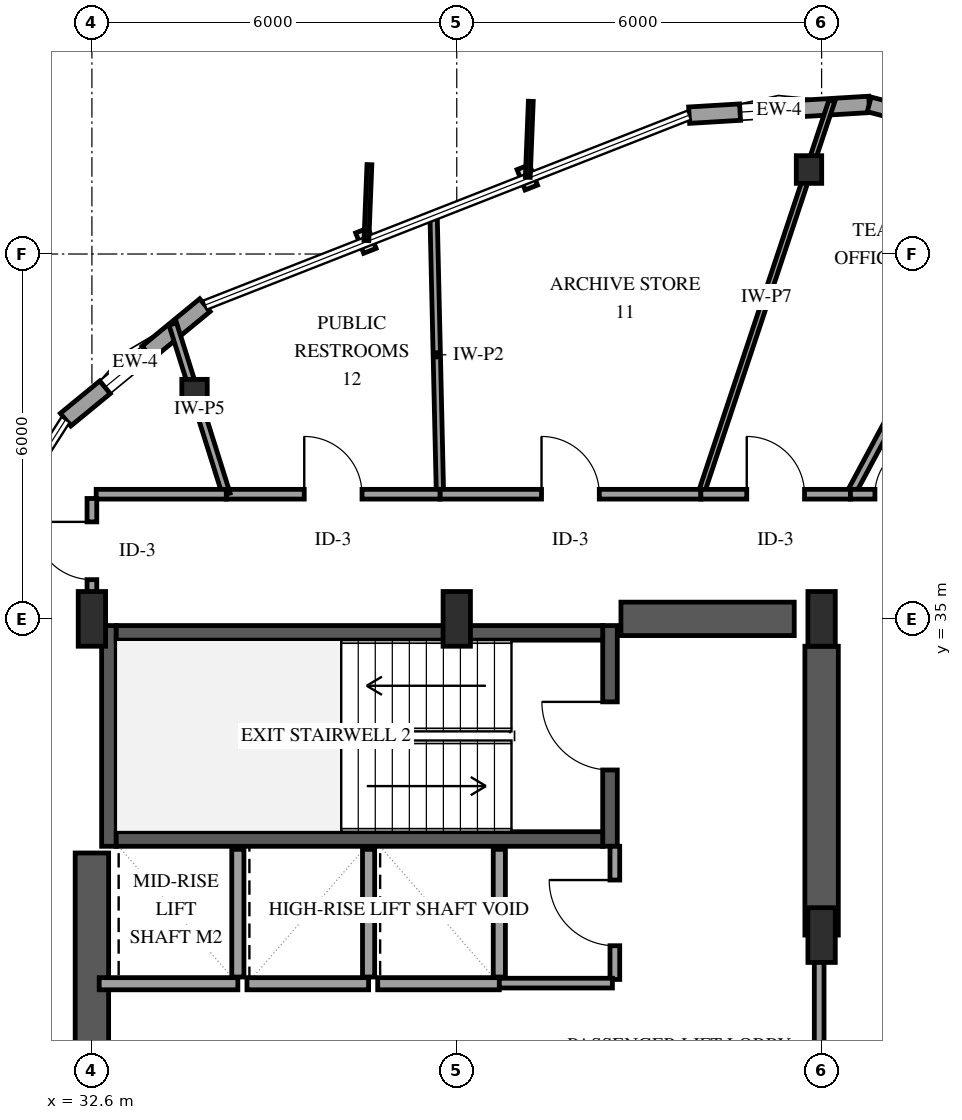
"""IFC4 building model, lengths in metres.
Left out: names, types, materials, properties, quantities, classifications, styles, units other than length and angle.
Written with IfcOpenShell. Run it as: python <this file> out.ifc"""

import sys

from ifc_helpers import new_model, si_unit, direction, frame, frame_2d, origin, origin_2d, place, context, subcontext, project, spatial, rectangle, i_section, extrude, element, fill, save


model = new_model("IFC4")
c1 = context("Model", 3, precision=1e-05, world=origin(), true_north=direction((0.0, 1.0)))
c2 = subcontext(c1, "Body", "Model", "MODEL_VIEW")
j1 = project(units=[si_unit("LENGTHUNIT", "METRE"), si_unit("PLANEANGLEUNIT", "RADIAN")], contexts=[c1])
p1 = place(None, origin())
s1 = spatial("IfcSite", under=j1, at=p1, CompositionType="ELEMENT")
p2 = place(p1, origin())
s2 = spatial("IfcBuilding", under=s1, at=p2, CompositionType="ELEMENT")
p3 = place(p2, frame((0.0, 0.0, 110.8)))
s3 = spatial("IfcBuildingStorey", under=s2, at=p3, CompositionType="ELEMENT", Elevation=110.8)
p4 = place(p3, frame((32.88, 31.26, 0.0), z_axis=(0.0, 0.0, 1.0), x_axis=(0.0, 1.0, 0.0)))
e1 = element("IfcWall", 1, at=p4, inside=s3, PredefinedType="SHEAR", context=c2, shape_type="SweptSolid", body=[
    extrude(rectangle(XDim=3.63, YDim=0.24, at=frame_2d((1.815, 0.0))), origin(), (0.0, 0.0, 1.0), 3.9),
])
p5 = place(p3, frame((41.12, 31.26, 0.0), z_axis=(0.0, 0.0, 1.0), x_axis=(0.0, 1.0, 0.0)))
e2 = element("IfcWall", 2, at=p5, inside=s3, PredefinedType="SHEAR", context=c2, shape_type="SweptSolid", body=[
    extrude(rectangle(XDim=3.63, YDim=0.24, at=frame_2d((1.815, 0.0))), origin(), (0.0, 0.0, 1.0), 3.9),
])
p6 = place(p5, frame((1.255, 0.0, 0.0)))
e3 = element("IfcOpeningElement", 3, at=p6, cuts=e2, PredefinedType="OPENING", context=c2, shape_type="SweptSolid", body=[
    extrude(rectangle(XDim=1.12, YDim=2.15, at=frame_2d((0.56, 1.075))), frame((0.0, 0.13, 0.0), z_axis=(0.0, -1.0, 0.0), x_axis=(1.0, 0.0, 0.0)), (0.0, 0.0, 1.0), 0.26),
])
for number, where, z_axis, x_axis in (
    (4, (33.0, 31.38, 0.0), (0.0, 0.0, 1.0), (1.0, 0.0, 0.0)),
    (5, (33.0, 34.77, 0.0), (0.0, 0.0, 1.0), (1.0, 0.0, 0.0)),
):
    element("IfcWall", number, at=place(p3, frame(where, z_axis=z_axis, x_axis=x_axis)), inside=s3, PredefinedType="SHEAR", context=c2, shape_type="SweptSolid", body=[
        extrude(rectangle(XDim=8.0, YDim=0.24, at=frame_2d((4.0, 0.0))), origin(), (0.0, 0.0, 1.0), 3.9),
    ])
p7 = place(p3, frame((32.6, 18.85, 0.0), z_axis=(0.0, 0.0, 1.0), x_axis=(0.0, 1.0, 0.0)))
e6 = element("IfcWall", 6, at=p7, inside=s3, PredefinedType="SHEAR", context=c2, shape_type="SweptSolid", body=[
    extrude(rectangle(XDim=12.3, YDim=0.55, at=frame_2d((6.15, 0.0))), origin(), (0.0, 0.0, 1.0), 3.9),
])
p8 = place(p3, frame((41.3, 35.0, 0.0), z_axis=(0.0, 0.0, 1.0), x_axis=(1.0, 0.0, 0.0)))
e7 = element("IfcWall", 7, at=p8, inside=s3, PredefinedType="SHEAR", context=c2, shape_type="SweptSolid", body=[
    extrude(rectangle(XDim=2.85, YDim=0.55, at=frame_2d((1.425, 0.0))), origin(), (0.0, 0.0, 1.0), 3.9),
])
p9 = place(p3, frame((44.6, 29.8, 0.0), z_axis=(0.0, 0.0, 1.0), x_axis=(0.0, 1.0, 0.0)))
e8 = element("IfcWall", 8, at=p9, inside=s3, PredefinedType="SHEAR", context=c2, shape_type="SweptSolid", body=[
    extrude(rectangle(XDim=4.75, YDim=0.55, at=frame_2d((2.375, 0.0))), origin(), (0.0, 0.0, 1.0), 3.9),
])
for number, where, z_axis, x_axis in (
    (9, (32.6, 35.0, 0.0), (0.0, 0.0, 1.0), (1.0, 0.0, 0.0)),
    (10, (38.6, 35.0, 0.0), (0.0, 0.0, 1.0), (1.0, 0.0, 0.0)),
    (11, (44.6, 29.8, 0.0), (0.0, 0.0, 1.0), (1.0, 0.0, 0.0)),
    (12, (44.6, 35.0, 0.0), (0.0, 0.0, 1.0), (1.0, 0.0, 0.0)),
):
    element("IfcColumn", number, at=place(p3, frame(where, z_axis=z_axis, x_axis=x_axis)), inside=s3, PredefinedType="PILASTER", context=c2, shape_type="SweptSolid", body=[
        extrude(rectangle(XDim=0.45, YDim=0.9, at=origin_2d()), origin(), (0.0, 0.0, 1.0), 3.9),
    ])
for number, where, z_axis, x_axis in (
    (13, (44.393, 42.389, 0.0), (0.0, 0.0, 1.0), (1.0, 0.0, 0.0)),
    (14, (34.288, 38.711, 0.0), (0.0, 0.0, 1.0), (1.0, 0.0, 0.0)),
):
    element("IfcColumn", number, at=place(p3, frame(where, z_axis=z_axis, x_axis=x_axis)), inside=s3, PredefinedType="COLUMN", context=c2, shape_type="SweptSolid", body=[
        extrude(i_section(OverallWidth=0.418, OverallDepth=0.455, WebThickness=0.042, FlangeThickness=0.068, FilletRadius=0.038, at=origin_2d()), origin(), (0.0, 0.0, 1.0), 3.9),
    ])
p10 = place(p3, frame((45.383, 43.46, 0.0), z_axis=(0.0, 0.0, 1.0), x_axis=(-0.998218594755, -0.059662694245, 0.0)))
e15 = element("IfcWall", 15, at=p10, inside=s3, PredefinedType="SOLIDWALL", context=c2, shape_type="SweptSolid", body=[
    extrude(rectangle(XDim=2.967, YDim=0.27, at=frame_2d((1.483, 0.0))), origin(), (0.0, 0.0, 1.0), 2.979),
])
p11 = place(p10, frame((1.228, 0.0, 0.75)))
e16 = element("IfcOpeningElement", 16, at=p11, cuts=e15, PredefinedType="OPENING", context=c2, shape_type="SweptSolid", body=[
    extrude(rectangle(XDim=0.9, YDim=1.5, at=frame_2d((0.45, 0.75))), frame((0.0, 0.145, 0.0), z_axis=(0.0, -1.0, 0.0), x_axis=(1.0, 0.0, 0.0)), (0.0, 0.0, 1.0), 0.29),
])
p12 = place(p3, frame((53.66, 41.307, 0.0), z_axis=(0.0, 0.0, 1.0), x_axis=(-0.967796780787, 0.251732777164, 0.0)))
e17 = element("IfcWall", 17, at=p12, inside=s3, PredefinedType="SOLIDWALL", context=c2, shape_type="SweptSolid", body=[
    extrude(rectangle(XDim=8.553, YDim=0.25, at=frame_2d((4.276, 0.0))), origin(), (0.0, 0.0, 1.0), 2.979),
])
p13 = place(p12, frame((3.777, 0.0, 0.0)))
e18 = element("IfcOpeningElement", 18, at=p13, cuts=e17, PredefinedType="OPENING", context=c2, shape_type="SweptSolid", body=[
    extrude(rectangle(XDim=1.05, YDim=2.15, at=frame_2d((0.525, 1.075))), frame((0.0, 0.135, 0.0), z_axis=(0.0, -1.0, 0.0), x_axis=(1.0, 0.0, 0.0)), (0.0, 0.0, 1.0), 0.27),
])
p14 = place(p12, frame((0.44, 0.0, 0.72)))
e19 = element("IfcOpeningElement", 19, at=p14, cuts=e17, PredefinedType="OPENING", context=c2, shape_type="SweptSolid", body=[
    extrude(rectangle(XDim=1.2, YDim=1.6, at=frame_2d((0.6, 0.8))), frame((0.0, 0.135, 0.0), z_axis=(0.0, -1.0, 0.0), x_axis=(1.0, 0.0, 0.0)), (0.0, 0.0, 1.0), 0.27),
])
p15 = place(p12, frame((6.19, 0.0, 0.72)))
e20 = element("IfcOpeningElement", 20, at=p15, cuts=e17, PredefinedType="OPENING", context=c2, shape_type="SweptSolid", body=[
    extrude(rectangle(XDim=1.2, YDim=1.6, at=frame_2d((0.6, 0.8))), frame((0.0, 0.135, 0.0), z_axis=(0.0, -1.0, 0.0), x_axis=(1.0, 0.0, 0.0)), (0.0, 0.0, 1.0), 0.27),
])
p16 = place(p3, frame((34.459, 40.16, 0.0), z_axis=(0.0, 0.0, 1.0), x_axis=(-0.772514297214, -0.634997370545, 0.0)))
e21 = element("IfcWall", 21, at=p16, inside=s3, PredefinedType="SOLIDWALL", context=c2, shape_type="SweptSolid", body=[
    extrude(rectangle(XDim=2.967, YDim=0.27, at=frame_2d((1.483, 0.0))), origin(), (0.0, 0.0, 1.0), 2.979),
])
p17 = place(p16, frame((1.228, 0.0, 0.75)))
e22 = element("IfcOpeningElement", 22, at=p17, cuts=e21, PredefinedType="OPENING", context=c2, shape_type="SweptSolid", body=[
    extrude(rectangle(XDim=0.9, YDim=1.5, at=frame_2d((0.45, 0.75))), frame((0.0, 0.145, 0.0), z_axis=(0.0, -1.0, 0.0), x_axis=(1.0, 0.0, 0.0)), (0.0, 0.0, 1.0), 0.29),
])
p18 = place(p3, frame((32.72, 29.0, 0.0), z_axis=(0.0, 0.0, 1.0), x_axis=(1.0, 0.0, 0.0)))
e23 = element("IfcWall", 23, at=p18, inside=s3, PredefinedType="SOLIDWALL", context=c2, shape_type="SweptSolid", body=[
    extrude(rectangle(XDim=2.28, YDim=0.2, at=frame_2d((1.14, 0.0))), origin(), (0.0, 0.0, 1.0), 3.6),
])
p19 = place(p3, frame((35.0, 29.11, 0.0), z_axis=(0.0, 0.0, 1.0), x_axis=(0.0, 1.0, 0.0)))
e24 = element("IfcWall", 24, at=p19, inside=s3, PredefinedType="SOLIDWALL", context=c2, shape_type="SweptSolid", body=[
    extrude(rectangle(XDim=2.1, YDim=0.2, at=frame_2d((1.05, 0.0))), origin(), (0.0, 0.0, 1.0), 3.6),
])
p20 = place(p3, frame((35.15, 29.0, 0.0), z_axis=(0.0, 0.0, 1.0), x_axis=(1.0, 0.0, 0.0)))
e25 = element("IfcWall", 25, at=p20, inside=s3, PredefinedType="SOLIDWALL", context=c2, shape_type="SweptSolid", body=[
    extrude(rectangle(XDim=2.0, YDim=0.2, at=frame_2d((1.0, 0.0))), origin(), (0.0, 0.0, 1.0), 3.6),
])
p21 = place(p3, frame((37.15, 29.11, 0.0), z_axis=(0.0, 0.0, 1.0), x_axis=(0.0, 1.0, 0.0)))
e26 = element("IfcWall", 26, at=p21, inside=s3, PredefinedType="SOLIDWALL", context=c2, shape_type="SweptSolid", body=[
    extrude(rectangle(XDim=2.1, YDim=0.2, at=frame_2d((1.05, 0.0))), origin(), (0.0, 0.0, 1.0), 3.6),
])
p22 = place(p3, frame((37.3, 29.0, 0.0), z_axis=(0.0, 0.0, 1.0), x_axis=(1.0, 0.0, 0.0)))
e27 = element("IfcWall", 27, at=p22, inside=s3, PredefinedType="SOLIDWALL", context=c2, shape_type="SweptSolid", body=[
    extrude(rectangle(XDim=2.0, YDim=0.2, at=frame_2d((1.0, 0.0))), origin(), (0.0, 0.0, 1.0), 3.6),
])
p23 = place(p3, frame((39.3, 29.11, 0.0), z_axis=(0.0, 0.0, 1.0), x_axis=(0.0, 1.0, 0.0)))
e28 = element("IfcWall", 28, at=p23, inside=s3, PredefinedType="SOLIDWALL", context=c2, shape_type="SweptSolid", body=[
    extrude(rectangle(XDim=2.1, YDim=0.2, at=frame_2d((1.05, 0.0))), origin(), (0.0, 0.0, 1.0), 3.6),
])
p24 = place(p3, frame((44.56, 29.8, 0.0), z_axis=(0.0, 0.0, 1.0), x_axis=(0.0, -1.0, 0.0)))
e29 = element("IfcWall", 29, at=p24, inside=s3, PredefinedType="PARTITIONING", context=c2, shape_type="SweptSolid", body=[
    extrude(rectangle(XDim=6.91, YDim=0.16, at=frame_2d((3.455, 0.0))), origin(), (0.0, 0.0, 1.0), 2.64),
])
p25 = place(p24, frame((2.915, 0.0, 0.0)))
e30 = element("IfcOpeningElement", 30, at=p25, cuts=e29, PredefinedType="OPENING", context=c2, shape_type="SweptSolid", body=[
    extrude(rectangle(XDim=1.08, YDim=2.15, at=frame_2d((0.54, 1.075))), frame((0.0, 0.09, 0.0), z_axis=(0.0, -1.0, 0.0), x_axis=(1.0, 0.0, 0.0)), (0.0, 0.0, 1.0), 0.18),
])
p26 = place(p3, frame((42.614, 37.05, 0.0), z_axis=(0.0, 0.0, 1.0), x_axis=(0.316012953592, 0.948754875172, 0.0)))
e31 = element("IfcWall", 31, at=p26, inside=s3, PredefinedType="PARTITIONING", context=c2, shape_type="SweptSolid", body=[
    extrude(rectangle(XDim=6.819, YDim=0.1, at=frame_2d((3.41, 0.0))), origin(), (0.0, 0.0, 1.0), 2.895),
])
p27 = place(p3, frame((45.074, 37.05, 0.0), z_axis=(0.0, 0.0, 1.0), x_axis=(0.473201001123, 0.880954489481, 0.0)))
e32 = element("IfcWall", 32, at=p27, inside=s3, PredefinedType="PARTITIONING", context=c2, shape_type="SweptSolid", body=[
    extrude(rectangle(XDim=6.465, YDim=0.14, at=frame_2d((3.232, 0.0))), origin(), (0.0, 0.0, 1.0), 2.974),
])
p28 = place(p3, frame((38.324, 37.05, 0.0), z_axis=(0.0, 0.0, 1.0), x_axis=(-0.022890699076, 0.999737973619, 0.0)))
e33 = element("IfcWall", 33, at=p28, inside=s3, PredefinedType="PARTITIONING", context=c2, shape_type="SweptSolid", body=[
    extrude(rectangle(XDim=4.586, YDim=0.12, at=frame_2d((2.293, 0.0))), origin(), (0.0, 0.0, 1.0), 3.6),
])
p29 = place(p3, frame((38.324, 37.05, 0.0), z_axis=(0.0, 0.0, 1.0), x_axis=(1.0, 0.0, 0.0)))
e34 = element("IfcWall", 34, at=p29, inside=s3, PredefinedType="PARTITIONING", context=c2, shape_type="SweptSolid", body=[
    extrude(rectangle(XDim=4.29, YDim=0.16, at=frame_2d((2.145, 0.0))), origin(), (0.0, 0.0, 1.0), 3.6),
])
p30 = place(p29, frame((1.67, 0.0, 0.0)))
e35 = element("IfcOpeningElement", 35, at=p30, cuts=e34, PredefinedType="OPENING", context=c2, shape_type="SweptSolid", body=[
    extrude(rectangle(XDim=0.95, YDim=2.15, at=frame_2d((0.475, 1.075))), frame((0.0, 0.09, 0.0), z_axis=(0.0, -1.0, 0.0), x_axis=(1.0, 0.0, 0.0)), (0.0, 0.0, 1.0), 0.18),
])
p31 = place(p3, frame((34.81, 37.05, 0.0), z_axis=(0.0, 0.0, 1.0), x_axis=(1.0, 0.0, 0.0)))
e36 = element("IfcWall", 36, at=p31, inside=s3, PredefinedType="PARTITIONING", context=c2, shape_type="SweptSolid", body=[
    extrude(rectangle(XDim=3.514, YDim=0.16, at=frame_2d((1.757, 0.0))), origin(), (0.0, 0.0, 1.0), 3.6),
])
p32 = place(p31, frame((1.282, 0.0, 0.0)))
e37 = element("IfcOpeningElement", 37, at=p32, cuts=e36, PredefinedType="OPENING", context=c2, shape_type="SweptSolid", body=[
    extrude(rectangle(XDim=0.95, YDim=2.15, at=frame_2d((0.475, 1.075))), frame((0.0, 0.09, 0.0), z_axis=(0.0, -1.0, 0.0), x_axis=(1.0, 0.0, 0.0)), (0.0, 0.0, 1.0), 0.18),
])
p33 = place(p3, frame((34.81, 37.05, 0.0), z_axis=(0.0, 0.0, 1.0), x_axis=(-0.299956409632, 0.953952908859, 0.0)))
e38 = element("IfcWall", 38, at=p33, inside=s3, PredefinedType="PARTITIONING", context=c2, shape_type="SweptSolid", body=[
    extrude(rectangle(XDim=2.934, YDim=0.13, at=frame_2d((1.467, 0.0))), origin(), (0.0, 0.0, 1.0), 2.895),
])
p34 = place(p3, frame((42.614, 37.05, 0.0), z_axis=(0.0, 0.0, 1.0), x_axis=(1.0, 0.0, 0.0)))
e39 = element("IfcWall", 39, at=p34, inside=s3, PredefinedType="PARTITIONING", context=c2, shape_type="SweptSolid", body=[
    extrude(rectangle(XDim=2.46, YDim=0.16, at=frame_2d((1.23, 0.0))), origin(), (0.0, 0.0, 1.0), 3.6),
])
p35 = place(p34, frame((0.755, 0.0, 0.0)))
e40 = element("IfcOpeningElement", 40, at=p35, cuts=e39, PredefinedType="OPENING", context=c2, shape_type="SweptSolid", body=[
    extrude(rectangle(XDim=0.95, YDim=2.15, at=frame_2d((0.475, 1.075))), frame((0.0, 0.09, 0.0), z_axis=(0.0, -1.0, 0.0), x_axis=(1.0, 0.0, 0.0)), (0.0, 0.0, 1.0), 0.18),
])
p36 = place(p3, frame((41.2, 29.07, 0.0), z_axis=(0.0, 0.0, 1.0), x_axis=(0.0, 1.0, 0.0)))
e41 = element("IfcWall", 41, at=p36, inside=s3, PredefinedType="PARTITIONING", context=c2, shape_type="SweptSolid", body=[
    extrude(rectangle(XDim=2.19, YDim=0.16, at=frame_2d((1.095, 0.0))), origin(), (0.0, 0.0, 1.0), 3.6),
])
p37 = place(p36, frame((0.555, 0.0, 0.0)))
e42 = element("IfcOpeningElement", 42, at=p37, cuts=e41, PredefinedType="OPENING", context=c2, shape_type="SweptSolid", body=[
    extrude(rectangle(XDim=1.08, YDim=2.15, at=frame_2d((0.54, 1.075))), frame((0.0, 0.09, 0.0), z_axis=(0.0, -1.0, 0.0), x_axis=(1.0, 0.0, 0.0)), (0.0, 0.0, 1.0), 0.18),
])
p38 = place(p3, frame((32.67, 37.05, 0.0), z_axis=(0.0, 0.0, 1.0), x_axis=(1.0, 0.0, 0.0)))
e43 = element("IfcWall", 43, at=p38, inside=s3, PredefinedType="PARTITIONING", context=c2, shape_type="SweptSolid", body=[
    extrude(rectangle(XDim=2.14, YDim=0.16, at=frame_2d((1.07, 0.0))), origin(), (0.0, 0.0, 1.0), 3.6),
])
p39 = place(p3, frame((32.6, 35.07, 0.0), z_axis=(0.0, 0.0, 1.0), x_axis=(0.0, 1.0, 0.0)))
e44 = element("IfcWall", 44, at=p39, inside=s3, PredefinedType="PARTITIONING", context=c2, shape_type="SweptSolid", body=[
    extrude(rectangle(XDim=1.91, YDim=0.16, at=frame_2d((0.955, 0.0))), origin(), (0.0, 0.0, 1.0), 3.6),
])
p40 = place(p39, frame((0.575, 0.0, 0.0)))
e45 = element("IfcOpeningElement", 45, at=p40, cuts=e44, PredefinedType="OPENING", context=c2, shape_type="SweptSolid", body=[
    extrude(rectangle(XDim=0.95, YDim=2.15, at=frame_2d((0.475, 1.075))), frame((0.0, 0.09, 0.0), z_axis=(0.0, -1.0, 0.0), x_axis=(1.0, 0.0, 0.0)), (0.0, 0.0, 1.0), 0.18),
])
p41 = place(p3, frame((39.3, 29.01, 0.0), z_axis=(0.0, 0.0, 1.0), x_axis=(1.0, 0.0, 0.0)))
e46 = element("IfcWall", 46, at=p41, inside=s3, PredefinedType="PARTITIONING", context=c2, shape_type="SweptSolid", body=[
    extrude(rectangle(XDim=1.86, YDim=0.16, at=frame_2d((0.93, 0.0))), origin(), (0.0, 0.0, 1.0), 3.6),
])
p42 = place(p3, frame((45.074, 37.05, 0.0), z_axis=(0.0, 0.0, 1.0), x_axis=(1.0, 0.0, 0.0)))
e47 = element("IfcWall", 47, at=p42, inside=s3, PredefinedType="PARTITIONING", context=c2, shape_type="SweptSolid", body=[
    extrude(rectangle(XDim=1.506, YDim=0.16, at=frame_2d((0.753, 0.0))), origin(), (0.0, 0.0, 1.0), 3.6),
])
p43 = place(p42, frame((0.403, 0.0, 0.0)))
e48 = element("IfcOpeningElement", 48, at=p43, cuts=e47, PredefinedType="OPENING", context=c2, shape_type="SweptSolid", body=[
    extrude(rectangle(XDim=0.85, YDim=2.1, at=frame_2d((0.425, 1.05))), frame((0.0, 0.09, 0.0), z_axis=(0.0, -1.0, 0.0), x_axis=(1.0, 0.0, 0.0)), (0.0, 0.0, 1.0), 0.18),
])
p44 = place(p11, origin())
e49 = element("IfcWindow", 49, at=p44, inside=s3, PartitioningType="SINGLE_PANEL", PredefinedType="WINDOW", context=c2, shape_type="SweptSolid", body=[
    extrude(rectangle(XDim=0.9, YDim=1.5, at=frame_2d((0.45, 0.75))), frame((0.0, 0.03, 0.0), z_axis=(0.0, -1.0, 0.0), x_axis=(1.0, 0.0, 0.0)), (0.0, 0.0, 1.0), 0.06),
])
fill(e16, e49)
p45 = place(p17, origin())
e50 = element("IfcWindow", 50, at=p45, inside=s3, PartitioningType="SINGLE_PANEL", PredefinedType="WINDOW", context=c2, shape_type="SweptSolid", body=[
    extrude(rectangle(XDim=0.9, YDim=1.5, at=frame_2d((0.45, 0.75))), frame((0.0, 0.03, 0.0), z_axis=(0.0, -1.0, 0.0), x_axis=(1.0, 0.0, 0.0)), (0.0, 0.0, 1.0), 0.06),
])
fill(e22, e50)
p46 = place(p6, origin())
e51 = element("IfcDoor", 51, at=p46, inside=s3, OperationType="SINGLE_SWING_RIGHT", PredefinedType="DOOR", context=c2, shape_type="SweptSolid", body=[
    extrude(rectangle(XDim=1.12, YDim=2.15, at=frame_2d((0.56, 1.075))), frame((0.0, 0.025, 0.0), z_axis=(0.0, -1.0, 0.0), x_axis=(1.0, 0.0, 0.0)), (0.0, 0.0, 1.0), 0.05),
])
fill(e3, e51)
p47 = place(p30, origin())
e52 = element("IfcDoor", 52, at=p47, inside=s3, OperationType="SINGLE_SWING_LEFT", PredefinedType="DOOR", context=c2, shape_type="SweptSolid", body=[
    extrude(rectangle(XDim=0.95, YDim=2.15, at=frame_2d((0.475, 1.075))), frame((0.0, 0.025, 0.0), z_axis=(0.0, -1.0, 0.0), x_axis=(1.0, 0.0, 0.0)), (0.0, 0.0, 1.0), 0.05),
])
fill(e35, e52)
p48 = place(p32, origin())
e53 = element("IfcDoor", 53, at=p48, inside=s3, OperationType="SINGLE_SWING_LEFT", PredefinedType="DOOR", context=c2, shape_type="SweptSolid", body=[
    extrude(rectangle(XDim=0.95, YDim=2.15, at=frame_2d((0.475, 1.075))), frame((0.0, 0.025, 0.0), z_axis=(0.0, -1.0, 0.0), x_axis=(1.0, 0.0, 0.0)), (0.0, 0.0, 1.0), 0.05),
])
fill(e37, e53)
p49 = place(p35, origin())
e54 = element("IfcDoor", 54, at=p49, inside=s3, OperationType="SINGLE_SWING_LEFT", PredefinedType="DOOR", context=c2, shape_type="SweptSolid", body=[
    extrude(rectangle(XDim=0.95, YDim=2.15, at=frame_2d((0.475, 1.075))), frame((0.0, 0.025, 0.0), z_axis=(0.0, -1.0, 0.0), x_axis=(1.0, 0.0, 0.0)), (0.0, 0.0, 1.0), 0.05),
])
fill(e40, e54)
p50 = place(p37, origin())
e55 = element("IfcDoor", 55, at=p50, inside=s3, OperationType="SINGLE_SWING_RIGHT", PredefinedType="DOOR", context=c2, shape_type="SweptSolid", body=[
    extrude(rectangle(XDim=1.08, YDim=2.15, at=frame_2d((0.54, 1.075))), frame((0.0, 0.025, 0.0), z_axis=(0.0, -1.0, 0.0), x_axis=(1.0, 0.0, 0.0)), (0.0, 0.0, 1.0), 0.05),
])
fill(e42, e55)
p51 = place(p40, origin())
e56 = element("IfcDoor", 56, at=p51, inside=s3, OperationType="SINGLE_SWING_RIGHT", PredefinedType="DOOR", context=c2, shape_type="SweptSolid", body=[
    extrude(rectangle(XDim=0.95, YDim=2.15, at=frame_2d((0.475, 1.075))), frame((0.0, 0.025, 0.0), z_axis=(0.0, -1.0, 0.0), x_axis=(1.0, 0.0, 0.0)), (0.0, 0.0, 1.0), 0.05),
])
fill(e45, e56)
p52 = place(p43, origin())
e57 = element("IfcDoor", 57, at=p52, inside=s3, OperationType="SINGLE_SWING_RIGHT", PredefinedType="DOOR", context=c2, shape_type="SweptSolid", body=[
    extrude(rectangle(XDim=0.85, YDim=2.1, at=frame_2d((0.425, 1.05))), frame((0.0, 0.025, 0.0), z_axis=(0.0, -1.0, 0.0), x_axis=(1.0, 0.0, 0.0)), (0.0, 0.0, 1.0), 0.05),
])
fill(e48, e57)
save(model, sys.argv[1])
